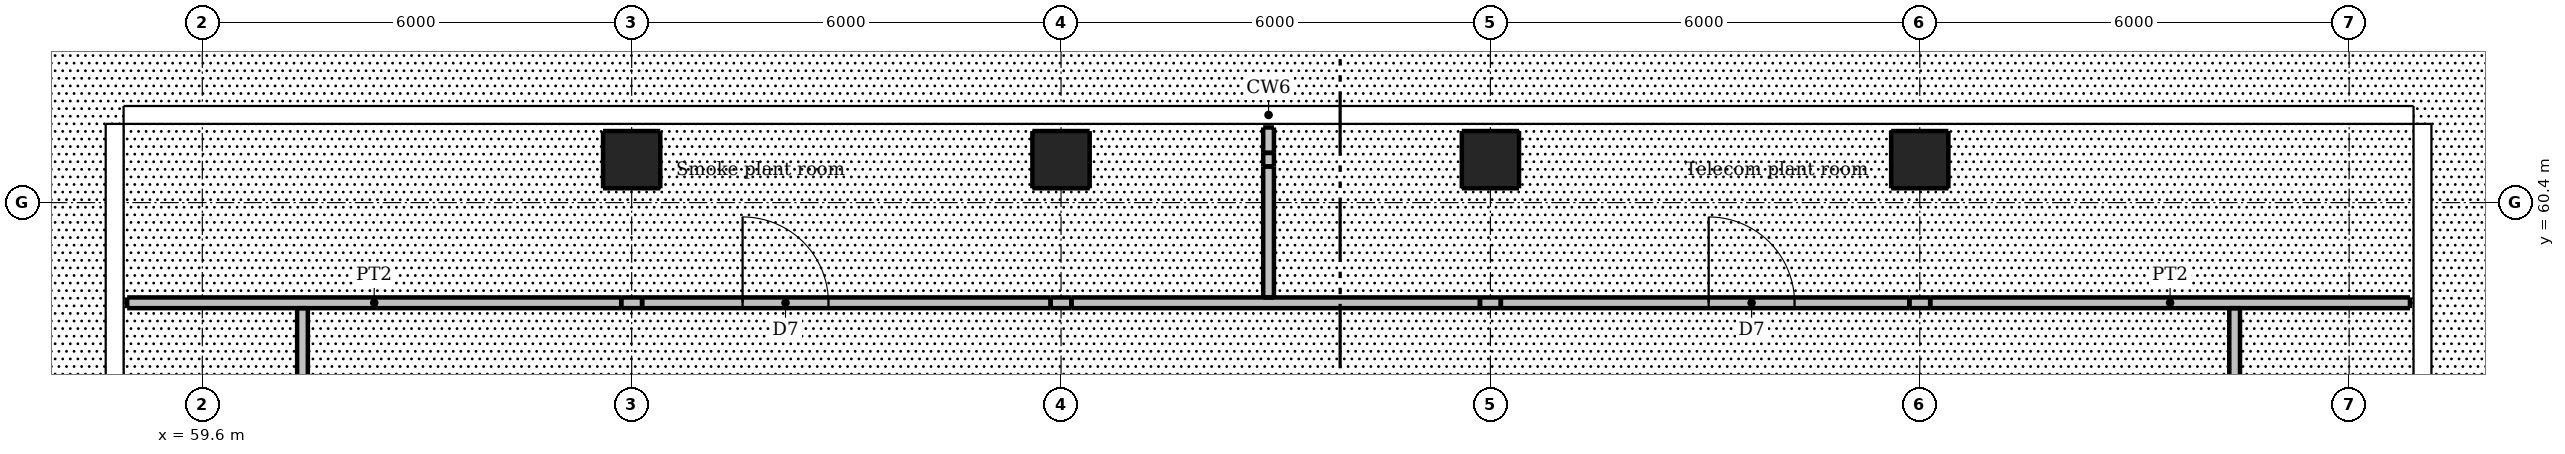
"""IFC4 building model, lengths in metres.
Left out: names, types, materials, properties, quantities, classifications, styles, units other than length and angle.
Written with IfcOpenShell. Run it as: python <this file> out.ifc"""

import sys

from ifc_helpers import new_model, si_unit, direction, frame, frame_2d, origin, origin_2d, place, context, subcontext, project, spatial, rectangle, extrude, element, fill, save


model = new_model("IFC4")
c1 = context("Model", 3, precision=1e-05, world=origin(), true_north=direction((0.0, 1.0)))
c2 = subcontext(c1, "Body", "Model", "MODEL_VIEW")
j1 = project(units=[si_unit("LENGTHUNIT", "METRE"), si_unit("PLANEANGLEUNIT", "RADIAN")], contexts=[c1])
p1 = place(None, origin())
s1 = spatial("IfcSite", under=j1, at=p1, CompositionType="ELEMENT")
p2 = place(p1, origin())
s2 = spatial("IfcBuilding", under=s1, at=p2, CompositionType="ELEMENT")
p3 = place(p2, frame((0.0, 0.0, 294.4)))
s3 = spatial("IfcBuildingStorey", under=s2, at=p3, CompositionType="ELEMENT", Elevation=294.4)
for number, where, z_axis, x_axis in (
    (1, (65.6, 61.0, 0.0), (0.0, 0.0, 1.0), (1.0, 0.0, 0.0)),
    (2, (71.6, 61.0, 0.0), (0.0, 0.0, 1.0), (1.0, 0.0, 0.0)),
    (3, (77.6, 61.0, 0.0), (0.0, 0.0, 1.0), (1.0, 0.0, 0.0)),
    (4, (83.6, 61.0, 0.0), (0.0, 0.0, 1.0), (1.0, 0.0, 0.0)),
):
    element("IfcColumn", number, at=place(p3, frame(where, z_axis=z_axis, x_axis=x_axis)), inside=s3, PredefinedType="COLUMN", context=c2, shape_type="SweptSolid", body=[
        extrude(rectangle(XDim=0.8, YDim=0.8, at=origin_2d()), origin(), (0.0, 0.0, 1.0), 3.3),
    ])
p4 = place(p3, frame((58.55, 59.0, 0.0), z_axis=(0.0, 0.0, 1.0), x_axis=(1.0, 0.0, 0.0)))
e5 = element("IfcWall", 5, at=p4, inside=s3, PredefinedType="PARTITIONING", context=c2, shape_type="SweptSolid", body=[
    extrude(rectangle(XDim=6.904, YDim=0.15, at=frame_2d((3.452, 0.0))), origin(), (0.0, 0.0, 1.0), 3.3),
])
p5 = place(p3, frame((65.454, 59.0, 0.0), z_axis=(0.0, 0.0, 1.0), x_axis=(1.0, 0.0, 0.0)))
e6 = element("IfcWall", 6, at=p5, inside=s3, PredefinedType="PARTITIONING", context=c2, shape_type="SweptSolid", body=[
    extrude(rectangle(XDim=0.292, YDim=0.15, at=frame_2d((0.146, 0.0))), origin(), (0.0, 0.0, 1.0), 2.465),
])
p6 = place(p3, frame((65.746, 59.0, 0.0), z_axis=(0.0, 0.0, 1.0), x_axis=(1.0, 0.0, 0.0)))
e7 = element("IfcWall", 7, at=p6, inside=s3, PredefinedType="PARTITIONING", context=c2, shape_type="SweptSolid", body=[
    extrude(rectangle(XDim=5.708, YDim=0.15, at=frame_2d((2.854, 0.0))), origin(), (0.0, 0.0, 1.0), 3.3),
])
p7 = place(p6, frame((1.404, 0.0, 0.0)))
e8 = element("IfcOpeningElement", 8, at=p7, cuts=e7, PredefinedType="OPENING", context=c2, shape_type="SweptSolid", body=[
    extrude(rectangle(XDim=1.2, YDim=2.1, at=frame_2d((0.6, 1.05))), frame((0.0, 0.085, 0.0), z_axis=(0.0, -1.0, 0.0), x_axis=(1.0, 0.0, 0.0)), (0.0, 0.0, 1.0), 0.17),
])
p8 = place(p3, frame((71.454, 59.0, 0.0), z_axis=(0.0, 0.0, 1.0), x_axis=(1.0, 0.0, 0.0)))
e9 = element("IfcWall", 9, at=p8, inside=s3, PredefinedType="PARTITIONING", context=c2, shape_type="SweptSolid", body=[
    extrude(rectangle(XDim=0.292, YDim=0.15, at=frame_2d((0.146, 0.0))), origin(), (0.0, 0.0, 1.0), 2.465),
])
p9 = place(p3, frame((71.746, 59.0, 0.0), z_axis=(0.0, 0.0, 1.0), x_axis=(1.0, 0.0, 0.0)))
e10 = element("IfcWall", 10, at=p9, inside=s3, PredefinedType="PARTITIONING", context=c2, shape_type="SweptSolid", body=[
    extrude(rectangle(XDim=5.708, YDim=0.15, at=frame_2d((2.854, 0.0))), origin(), (0.0, 0.0, 1.0), 3.3),
])
p10 = place(p3, frame((77.454, 59.0, 0.0), z_axis=(0.0, 0.0, 1.0), x_axis=(1.0, 0.0, 0.0)))
e11 = element("IfcWall", 11, at=p10, inside=s3, PredefinedType="PARTITIONING", context=c2, shape_type="SweptSolid", body=[
    extrude(rectangle(XDim=0.292, YDim=0.15, at=frame_2d((0.146, 0.0))), origin(), (0.0, 0.0, 1.0), 2.465),
])
p11 = place(p3, frame((77.746, 59.0, 0.0), z_axis=(0.0, 0.0, 1.0), x_axis=(1.0, 0.0, 0.0)))
e12 = element("IfcWall", 12, at=p11, inside=s3, PredefinedType="PARTITIONING", context=c2, shape_type="SweptSolid", body=[
    extrude(rectangle(XDim=5.708, YDim=0.15, at=frame_2d((2.854, 0.0))), origin(), (0.0, 0.0, 1.0), 3.3),
])
p12 = place(p11, frame((2.904, 0.0, 0.0)))
e13 = element("IfcOpeningElement", 13, at=p12, cuts=e12, PredefinedType="OPENING", context=c2, shape_type="SweptSolid", body=[
    extrude(rectangle(XDim=1.2, YDim=2.1, at=frame_2d((0.6, 1.05))), frame((0.0, 0.085, 0.0), z_axis=(0.0, -1.0, 0.0), x_axis=(1.0, 0.0, 0.0)), (0.0, 0.0, 1.0), 0.17),
])
p13 = place(p3, frame((83.454, 59.0, 0.0), z_axis=(0.0, 0.0, 1.0), x_axis=(1.0, 0.0, 0.0)))
e14 = element("IfcWall", 14, at=p13, inside=s3, PredefinedType="PARTITIONING", context=c2, shape_type="SweptSolid", body=[
    extrude(rectangle(XDim=0.292, YDim=0.15, at=frame_2d((0.146, 0.0))), origin(), (0.0, 0.0, 1.0), 2.465),
])
p14 = place(p3, frame((83.746, 59.0, 0.0), z_axis=(0.0, 0.0, 1.0), x_axis=(1.0, 0.0, 0.0)))
e15 = element("IfcWall", 15, at=p14, inside=s3, PredefinedType="PARTITIONING", context=c2, shape_type="SweptSolid", body=[
    extrude(rectangle(XDim=6.704, YDim=0.15, at=frame_2d((3.352, 0.0))), origin(), (0.0, 0.0, 1.0), 3.3),
])
p15 = place(p3, frame((61.0, 54.546, 0.0), z_axis=(0.0, 0.0, 1.0), x_axis=(0.0, 1.0, 0.0)))
e16 = element("IfcWall", 16, at=p15, inside=s3, PredefinedType="PARTITIONING", context=c2, shape_type="SweptSolid", body=[
    extrude(rectangle(XDim=4.379, YDim=0.15, at=frame_2d((2.189, 0.0))), origin(), (0.0, 0.0, 1.0), 3.3),
])
p16 = place(p3, frame((74.5, 59.075, 0.0), z_axis=(0.0, 0.0, 1.0), x_axis=(0.0, 1.0, 0.0)))
e17 = element("IfcWall", 17, at=p16, inside=s3, PredefinedType="PARTITIONING", context=c2, shape_type="SweptSolid", body=[
    extrude(rectangle(XDim=1.83, YDim=0.15, at=frame_2d((0.915, 0.0))), origin(), (0.0, 0.0, 1.0), 3.3),
])
p17 = place(p3, frame((74.5, 60.905, 0.0), z_axis=(0.0, 0.0, 1.0), x_axis=(0.0, 1.0, 0.0)))
e18 = element("IfcWall", 18, at=p17, inside=s3, PredefinedType="PARTITIONING", context=c2, shape_type="SweptSolid", body=[
    extrude(rectangle(XDim=0.19, YDim=0.15, at=frame_2d((0.095, 0.0))), origin(), (0.0, 0.0, 1.0), 2.847),
])
p18 = place(p3, frame((74.5, 61.095, 0.0), z_axis=(0.0, 0.0, 1.0), x_axis=(0.0, 1.0, 0.0)))
e19 = element("IfcWall", 19, at=p18, inside=s3, PredefinedType="PARTITIONING", context=c2, shape_type="SweptSolid", body=[
    extrude(rectangle(XDim=0.355, YDim=0.15, at=frame_2d((0.177, 0.0))), origin(), (0.0, 0.0, 1.0), 3.3),
])
p19 = place(p3, frame((88.0, 54.546, 0.0), z_axis=(0.0, 0.0, 1.0), x_axis=(0.0, 1.0, 0.0)))
e20 = element("IfcWall", 20, at=p19, inside=s3, PredefinedType="PARTITIONING", context=c2, shape_type="SweptSolid", body=[
    extrude(rectangle(XDim=4.379, YDim=0.15, at=frame_2d((2.189, 0.0))), origin(), (0.0, 0.0, 1.0), 3.3),
])
p20 = place(p7, origin())
e21 = element("IfcDoor", 21, at=p20, inside=s3, OperationType="SINGLE_SWING_LEFT", PredefinedType="DOOR", context=c2, shape_type="SweptSolid", body=[
    extrude(rectangle(XDim=1.2, YDim=2.1, at=frame_2d((0.6, 1.05))), frame((0.0, 0.025, 0.0), z_axis=(0.0, -1.0, 0.0), x_axis=(1.0, 0.0, 0.0)), (0.0, 0.0, 1.0), 0.05),
])
fill(e8, e21)
p21 = place(p12, origin())
e22 = element("IfcDoor", 22, at=p21, inside=s3, OperationType="SINGLE_SWING_LEFT", PredefinedType="DOOR", context=c2, shape_type="SweptSolid", body=[
    extrude(rectangle(XDim=1.2, YDim=2.1, at=frame_2d((0.6, 1.05))), frame((0.0, 0.025, 0.0), z_axis=(0.0, -1.0, 0.0), x_axis=(1.0, 0.0, 0.0)), (0.0, 0.0, 1.0), 0.05),
])
fill(e13, e22)
save(model, sys.argv[1])
